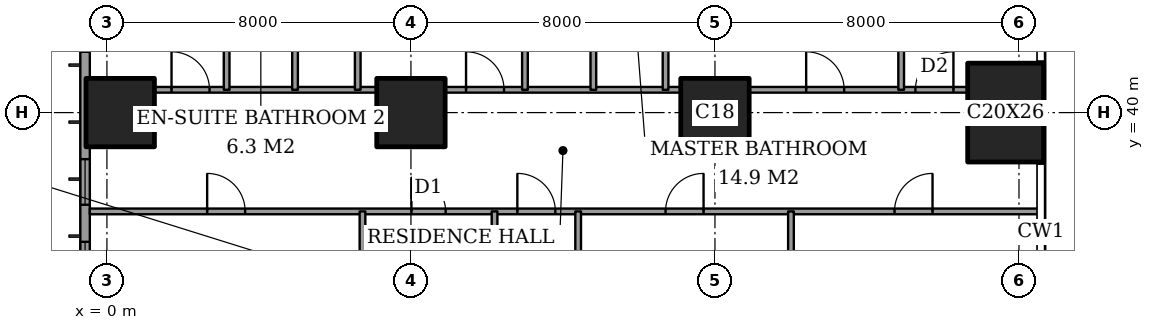
"""IFC4 building model, lengths in metres.
Left out: names, types, materials, properties, quantities, classifications, styles, units other than length and angle.
Written with IfcOpenShell. Run it as: python <this file> out.ifc"""

import sys

from ifc_helpers import new_model, si_unit, direction, frame, frame_2d, origin, origin_2d, place, context, subcontext, project, spatial, rectangle, extrude, element, fill, save


model = new_model("IFC4")
c1 = context("Model", 3, precision=1e-05, world=origin(), true_north=direction((0.0, 1.0)))
c2 = subcontext(c1, "Body", "Model", "MODEL_VIEW")
j1 = project(units=[si_unit("LENGTHUNIT", "METRE"), si_unit("PLANEANGLEUNIT", "RADIAN")], contexts=[c1])
p1 = place(None, origin())
s1 = spatial("IfcSite", under=j1, at=p1, CompositionType="ELEMENT")
p2 = place(p1, origin())
s2 = spatial("IfcBuilding", under=s1, at=p2, CompositionType="ELEMENT")
p3 = place(p2, frame((0.0, 0.0, 211.0)))
s3 = spatial("IfcBuildingStorey", under=s2, at=p3, CompositionType="ELEMENT", Elevation=211.0)
for number, where, z_axis, x_axis in (
    (1, (0.35, 40.0, 0.0), (0.0, 0.0, 1.0), (1.0, 0.0, 0.0)),
    (2, (8.0, 40.0, 0.0), (0.0, 0.0, 1.0), (1.0, 0.0, 0.0)),
    (3, (16.0, 40.0, 0.0), (0.0, 0.0, 1.0), (1.0, 0.0, 0.0)),
):
    element("IfcColumn", number, at=place(p3, frame(where, z_axis=z_axis, x_axis=x_axis)), inside=s3, PredefinedType="COLUMN", context=c2, shape_type="SweptSolid", body=[
        extrude(rectangle(XDim=1.8, YDim=1.8, at=origin_2d()), origin(), (0.0, 0.0, 1.0), 3.6),
    ])
p4 = place(p3, frame((23.65, 40.0, 0.0), z_axis=(0.0, 0.0, 1.0), x_axis=(1.0, 0.0, 0.0)))
e4 = element("IfcColumn", 4, at=p4, inside=s3, PredefinedType="COLUMN", context=c2, shape_type="SweptSolid", body=[
    extrude(rectangle(XDim=2.0, YDim=2.6, at=origin_2d()), origin(), (0.0, 0.0, 1.0), 3.6),
])
p5 = place(p3, frame((-0.575, 44.825, 0.0), z_axis=(0.0, 0.0, 1.0), x_axis=(0.0, -1.0, 0.0)))
e5 = element("IfcWall", 5, at=p5, inside=s3, PredefinedType="SOLIDWALL", context=c2, shape_type="SweptSolid", body=[
    extrude(rectangle(XDim=41.65, YDim=0.25, at=frame_2d((20.825, 0.0))), origin(), (0.0, 0.0, 1.0), 3.6),
])
p6 = place(p5, frame((0.825, 0.0, 0.2)))
e6 = element("IfcOpeningElement", 6, at=p6, cuts=e5, PredefinedType="OPENING", context=c2, shape_type="SweptSolid", body=[
    extrude(rectangle(XDim=2.4, YDim=2.4, at=frame_2d((1.2, 1.2))), frame((0.0, 0.135, 0.0), z_axis=(0.0, -1.0, 0.0), x_axis=(1.0, 0.0, 0.0)), (0.0, 0.0, 1.0), 0.27),
])
p7 = place(p5, frame((6.05, 0.0, 0.2)))
e7 = element("IfcOpeningElement", 7, at=p7, cuts=e5, PredefinedType="OPENING", context=c2, shape_type="SweptSolid", body=[
    extrude(rectangle(XDim=1.2, YDim=2.4, at=frame_2d((0.6, 1.2))), frame((0.0, 0.135, 0.0), z_axis=(0.0, -1.0, 0.0), x_axis=(1.0, 0.0, 0.0)), (0.0, 0.0, 1.0), 0.27),
])
p8 = place(p5, frame((8.225, 0.0, 0.2)))
e8 = element("IfcOpeningElement", 8, at=p8, cuts=e5, PredefinedType="OPENING", context=c2, shape_type="SweptSolid", body=[
    extrude(rectangle(XDim=2.4, YDim=2.4, at=frame_2d((1.2, 1.2))), frame((0.0, 0.135, 0.0), z_axis=(0.0, -1.0, 0.0), x_axis=(1.0, 0.0, 0.0)), (0.0, 0.0, 1.0), 0.27),
])
p9 = place(p5, frame((15.625, 0.0, 0.2)))
e9 = element("IfcOpeningElement", 9, at=p9, cuts=e5, PredefinedType="OPENING", context=c2, shape_type="SweptSolid", body=[
    extrude(rectangle(XDim=2.4, YDim=2.4, at=frame_2d((1.2, 1.2))), frame((0.0, 0.135, 0.0), z_axis=(0.0, -1.0, 0.0), x_axis=(1.0, 0.0, 0.0)), (0.0, 0.0, 1.0), 0.27),
])
p10 = place(p5, frame((23.625, 0.0, 0.2)))
e10 = element("IfcOpeningElement", 10, at=p10, cuts=e5, PredefinedType="OPENING", context=c2, shape_type="SweptSolid", body=[
    extrude(rectangle(XDim=2.4, YDim=2.4, at=frame_2d((1.2, 1.2))), frame((0.0, 0.135, 0.0), z_axis=(0.0, -1.0, 0.0), x_axis=(1.0, 0.0, 0.0)), (0.0, 0.0, 1.0), 0.27),
])
p11 = place(p5, frame((30.775, 0.0, 0.2)))
e11 = element("IfcOpeningElement", 11, at=p11, cuts=e5, PredefinedType="OPENING", context=c2, shape_type="SweptSolid", body=[
    extrude(rectangle(XDim=2.4, YDim=2.4, at=frame_2d((1.2, 1.2))), frame((0.0, 0.135, 0.0), z_axis=(0.0, -1.0, 0.0), x_axis=(1.0, 0.0, 0.0)), (0.0, 0.0, 1.0), 0.27),
])
p12 = place(p5, frame((34.55, 0.0, 0.2)))
e12 = element("IfcOpeningElement", 12, at=p12, cuts=e5, PredefinedType="OPENING", context=c2, shape_type="SweptSolid", body=[
    extrude(rectangle(XDim=1.2, YDim=2.4, at=frame_2d((0.6, 1.2))), frame((0.0, 0.135, 0.0), z_axis=(0.0, -1.0, 0.0), x_axis=(1.0, 0.0, 0.0)), (0.0, 0.0, 1.0), 0.27),
])
p13 = place(p5, frame((38.425, 0.0, 0.2)))
e13 = element("IfcOpeningElement", 13, at=p13, cuts=e5, PredefinedType="OPENING", context=c2, shape_type="SweptSolid", body=[
    extrude(rectangle(XDim=2.4, YDim=2.4, at=frame_2d((1.2, 1.2))), frame((0.0, 0.135, 0.0), z_axis=(0.0, -1.0, 0.0), x_axis=(1.0, 0.0, 0.0)), (0.0, 0.0, 1.0), 0.27),
])
p14 = place(p3, frame((-0.45, 37.4, 0.0), z_axis=(0.0, 0.0, 1.0), x_axis=(1.0, 0.0, 0.0)))
e14 = element("IfcWall", 14, at=p14, inside=s3, PredefinedType="PARTITIONING", context=c2, shape_type="SweptSolid", body=[
    extrude(rectangle(XDim=25.011, YDim=0.15, at=frame_2d((12.505, 0.0))), origin(), (0.0, 0.0, 1.0), 3.35),
])
p15 = place(p14, frame((11.25, 0.0, 0.0)))
e15 = element("IfcOpeningElement", 15, at=p15, cuts=e14, PredefinedType="OPENING", context=c2, shape_type="SweptSolid", body=[
    extrude(rectangle(XDim=1.0, YDim=2.1, at=frame_2d((0.5, 1.05))), frame((0.0, 0.085, 0.0), z_axis=(0.0, -1.0, 0.0), x_axis=(1.0, 0.0, 0.0)), (0.0, 0.0, 1.0), 0.17),
])
p16 = place(p14, frame((3.087, 0.0, 0.0)))
e16 = element("IfcOpeningElement", 16, at=p16, cuts=e14, PredefinedType="OPENING", context=c2, shape_type="SweptSolid", body=[
    extrude(rectangle(XDim=1.0, YDim=2.1, at=frame_2d((0.5, 1.05))), frame((0.0, 0.085, 0.0), z_axis=(0.0, -1.0, 0.0), x_axis=(1.0, 0.0, 0.0)), (0.0, 0.0, 1.0), 0.17),
])
p17 = place(p14, frame((8.462, 0.0, 0.0)))
e17 = element("IfcOpeningElement", 17, at=p17, cuts=e14, PredefinedType="OPENING", context=c2, shape_type="SweptSolid", body=[
    extrude(rectangle(XDim=0.9, YDim=2.1, at=frame_2d((0.45, 1.05))), frame((0.0, 0.085, 0.0), z_axis=(0.0, -1.0, 0.0), x_axis=(1.0, 0.0, 0.0)), (0.0, 0.0, 1.0), 0.17),
])
p18 = place(p14, frame((15.15, 0.0, 0.0)))
e18 = element("IfcOpeningElement", 18, at=p18, cuts=e14, PredefinedType="OPENING", context=c2, shape_type="SweptSolid", body=[
    extrude(rectangle(XDim=1.0, YDim=2.1, at=frame_2d((0.5, 1.05))), frame((0.0, 0.085, 0.0), z_axis=(0.0, -1.0, 0.0), x_axis=(1.0, 0.0, 0.0)), (0.0, 0.0, 1.0), 0.17),
])
p19 = place(p14, frame((21.175, 0.0, 0.0)))
e19 = element("IfcOpeningElement", 19, at=p19, cuts=e14, PredefinedType="OPENING", context=c2, shape_type="SweptSolid", body=[
    extrude(rectangle(XDim=1.0, YDim=2.1, at=frame_2d((0.5, 1.05))), frame((0.0, 0.085, 0.0), z_axis=(0.0, -1.0, 0.0), x_axis=(1.0, 0.0, 0.0)), (0.0, 0.0, 1.0), 0.17),
])
p20 = place(p3, frame((1.25, 40.6, 0.0), z_axis=(0.0, 0.0, 1.0), x_axis=(1.0, 0.0, 0.0)))
e20 = element("IfcWall", 20, at=p20, inside=s3, PredefinedType="PARTITIONING", context=c2, shape_type="SweptSolid", body=[
    extrude(rectangle(XDim=5.85, YDim=0.15, at=frame_2d((2.925, 0.0))), origin(), (0.0, 0.0, 1.0), 3.35),
])
p21 = place(p20, frame((0.45, 0.0, 0.0)))
e21 = element("IfcOpeningElement", 21, at=p21, cuts=e20, PredefinedType="OPENING", context=c2, shape_type="SweptSolid", body=[
    extrude(rectangle(XDim=1.0, YDim=2.1, at=frame_2d((0.5, 1.05))), frame((0.0, 0.085, 0.0), z_axis=(0.0, -1.0, 0.0), x_axis=(1.0, 0.0, 0.0)), (0.0, 0.0, 1.0), 0.17),
])
p22 = place(p3, frame((8.9, 40.6, 0.0), z_axis=(0.0, 0.0, 1.0), x_axis=(1.0, 0.0, 0.0)))
e22 = element("IfcWall", 22, at=p22, inside=s3, PredefinedType="PARTITIONING", context=c2, shape_type="SweptSolid", body=[
    extrude(rectangle(XDim=6.2, YDim=0.15, at=frame_2d((3.1, 0.0))), origin(), (0.0, 0.0, 1.0), 3.35),
])
p23 = place(p22, frame((0.55, 0.0, 0.0)))
e23 = element("IfcOpeningElement", 23, at=p23, cuts=e22, PredefinedType="OPENING", context=c2, shape_type="SweptSolid", body=[
    extrude(rectangle(XDim=1.0, YDim=2.1, at=frame_2d((0.5, 1.05))), frame((0.0, 0.085, 0.0), z_axis=(0.0, -1.0, 0.0), x_axis=(1.0, 0.0, 0.0)), (0.0, 0.0, 1.0), 0.17),
])
p24 = place(p3, frame((16.9, 40.6, 0.0), z_axis=(0.0, 0.0, 1.0), x_axis=(1.0, 0.0, 0.0)))
e24 = element("IfcWall", 24, at=p24, inside=s3, PredefinedType="PARTITIONING", context=c2, shape_type="SweptSolid", body=[
    extrude(rectangle(XDim=5.75, YDim=0.15, at=frame_2d((2.875, 0.0))), origin(), (0.0, 0.0, 1.0), 3.35),
])
p25 = place(p24, frame((1.5, 0.0, 0.0)))
e25 = element("IfcOpeningElement", 25, at=p25, cuts=e24, PredefinedType="OPENING", context=c2, shape_type="SweptSolid", body=[
    extrude(rectangle(XDim=1.0, YDim=2.1, at=frame_2d((0.5, 1.05))), frame((0.0, 0.085, 0.0), z_axis=(0.0, -1.0, 0.0), x_axis=(1.0, 0.0, 0.0)), (0.0, 0.0, 1.0), 0.17),
])
p26 = place(p24, frame((4.375, 0.0, 0.0)))
e26 = element("IfcOpeningElement", 26, at=p26, cuts=e24, PredefinedType="OPENING", context=c2, shape_type="SweptSolid", body=[
    extrude(rectangle(XDim=1.0, YDim=2.1, at=frame_2d((0.5, 1.05))), frame((0.0, 0.085, 0.0), z_axis=(0.0, -1.0, 0.0), x_axis=(1.0, 0.0, 0.0)), (0.0, 0.0, 1.0), 0.17),
])
p27 = place(p3, frame((3.15, 40.6, 0.0), z_axis=(0.0, 0.0, 1.0), x_axis=(0.0, 1.0, 0.0)))
e27 = element("IfcWall", 27, at=p27, inside=s3, PredefinedType="PARTITIONING", context=c2, shape_type="SweptSolid", body=[
    extrude(rectangle(XDim=3.5, YDim=0.15, at=frame_2d((1.75, 0.0))), origin(), (0.0, 0.0, 1.0), 3.35),
])
p28 = place(p27, frame((1.3, 0.0, 0.0)))
e28 = element("IfcOpeningElement", 28, at=p28, cuts=e27, PredefinedType="OPENING", context=c2, shape_type="SweptSolid", body=[
    extrude(rectangle(XDim=0.9, YDim=2.1, at=frame_2d((0.45, 1.05))), frame((0.0, 0.085, 0.0), z_axis=(0.0, -1.0, 0.0), x_axis=(1.0, 0.0, 0.0)), (0.0, 0.0, 1.0), 0.17),
])
p29 = place(p3, frame((4.95, 40.6, 0.0), z_axis=(0.0, 0.0, 1.0), x_axis=(0.0, 1.0, 0.0)))
e29 = element("IfcWall", 29, at=p29, inside=s3, PredefinedType="PARTITIONING", context=c2, shape_type="SweptSolid", body=[
    extrude(rectangle(XDim=7.85, YDim=0.15, at=frame_2d((3.925, 0.0))), origin(), (0.0, 0.0, 1.0), 3.35),
])
p30 = place(p29, frame((5.225, 0.0, 0.0)))
e30 = element("IfcOpeningElement", 30, at=p30, cuts=e29, PredefinedType="OPENING", context=c2, shape_type="SweptSolid", body=[
    extrude(rectangle(XDim=0.9, YDim=2.1, at=frame_2d((0.45, 1.05))), frame((0.0, 0.085, 0.0), z_axis=(0.0, -1.0, 0.0), x_axis=(1.0, 0.0, 0.0)), (0.0, 0.0, 1.0), 0.17),
])
p31 = place(p3, frame((6.6, 40.6, 0.0), z_axis=(0.0, 0.0, 1.0), x_axis=(0.0, 1.0, 0.0)))
e31 = element("IfcWall", 31, at=p31, inside=s3, PredefinedType="PARTITIONING", context=c2, shape_type="SweptSolid", body=[
    extrude(rectangle(XDim=7.85, YDim=0.15, at=frame_2d((3.925, 0.0))), origin(), (0.0, 0.0, 1.0), 3.35),
])
p32 = place(p3, frame((6.725, 33.2, 0.0), z_axis=(0.0, 0.0, 1.0), x_axis=(0.0, 1.0, 0.0)))
e32 = element("IfcWall", 32, at=p32, inside=s3, PredefinedType="PARTITIONING", context=c2, shape_type="SweptSolid", body=[
    extrude(rectangle(XDim=4.2, YDim=0.15, at=frame_2d((2.1, 0.0))), origin(), (0.0, 0.0, 1.0), 3.35),
])
p33 = place(p3, frame((10.2, 28.0, 0.0), z_axis=(0.0, 0.0, 1.0), x_axis=(0.0, 1.0, 0.0)))
e33 = element("IfcWall", 33, at=p33, inside=s3, PredefinedType="PARTITIONING", context=c2, shape_type="SweptSolid", body=[
    extrude(rectangle(XDim=9.4, YDim=0.15, at=frame_2d((4.7, 0.0))), origin(), (0.0, 0.0, 1.0), 3.35),
])
p34 = place(p33, frame((0.837, 0.0, 0.0)))
e34 = element("IfcOpeningElement", 34, at=p34, cuts=e33, PredefinedType="OPENING", context=c2, shape_type="SweptSolid", body=[
    extrude(rectangle(XDim=1.0, YDim=2.1, at=frame_2d((0.5, 1.05))), frame((0.0, 0.085, 0.0), z_axis=(0.0, -1.0, 0.0), x_axis=(1.0, 0.0, 0.0)), (0.0, 0.0, 1.0), 0.17),
])
p35 = place(p3, frame((11.0, 40.6, 0.0), z_axis=(0.0, 0.0, 1.0), x_axis=(0.0, 1.0, 0.0)))
e35 = element("IfcWall", 35, at=p35, inside=s3, PredefinedType="PARTITIONING", context=c2, shape_type="SweptSolid", body=[
    extrude(rectangle(XDim=7.85, YDim=0.15, at=frame_2d((3.925, 0.0))), origin(), (0.0, 0.0, 1.0), 3.35),
])
p36 = place(p35, frame((3.475, 0.0, 0.0)))
e36 = element("IfcOpeningElement", 36, at=p36, cuts=e35, PredefinedType="OPENING", context=c2, shape_type="SweptSolid", body=[
    extrude(rectangle(XDim=0.9, YDim=2.1, at=frame_2d((0.45, 1.05))), frame((0.0, 0.085, 0.0), z_axis=(0.0, -1.0, 0.0), x_axis=(1.0, 0.0, 0.0)), (0.0, 0.0, 1.0), 0.17),
])
p37 = place(p3, frame((12.4, 30.675, 0.0), z_axis=(0.0, 0.0, 1.0), x_axis=(0.0, 1.0, 0.0)))
e37 = element("IfcWall", 37, at=p37, inside=s3, PredefinedType="PARTITIONING", context=c2, shape_type="SweptSolid", body=[
    extrude(rectangle(XDim=6.725, YDim=0.15, at=frame_2d((3.362, 0.0))), origin(), (0.0, 0.0, 1.0), 3.35),
])
p38 = place(p3, frame((12.8, 40.6, 0.0), z_axis=(0.0, 0.0, 1.0), x_axis=(0.0, 1.0, 0.0)))
e38 = element("IfcWall", 38, at=p38, inside=s3, PredefinedType="PARTITIONING", context=c2, shape_type="SweptSolid", body=[
    extrude(rectangle(XDim=7.85, YDim=0.15, at=frame_2d((3.925, 0.0))), origin(), (0.0, 0.0, 1.0), 3.35),
])
p39 = place(p3, frame((14.7, 40.6, 0.0), z_axis=(0.0, 0.0, 1.0), x_axis=(0.0, 1.0, 0.0)))
e39 = element("IfcWall", 39, at=p39, inside=s3, PredefinedType="PARTITIONING", context=c2, shape_type="SweptSolid", body=[
    extrude(rectangle(XDim=7.85, YDim=0.15, at=frame_2d((3.925, 0.0))), origin(), (0.0, 0.0, 1.0), 3.35),
])
p40 = place(p39, frame((3.475, 0.0, 0.0)))
e40 = element("IfcOpeningElement", 40, at=p40, cuts=e39, PredefinedType="OPENING", context=c2, shape_type="SweptSolid", body=[
    extrude(rectangle(XDim=0.9, YDim=2.1, at=frame_2d((0.45, 1.05))), frame((0.0, 0.085, 0.0), z_axis=(0.0, -1.0, 0.0), x_axis=(1.0, 0.0, 0.0)), (0.0, 0.0, 1.0), 0.17),
])
p41 = place(p3, frame((18.0, 28.0, 0.0), z_axis=(0.0, 0.0, 1.0), x_axis=(0.0, 1.0, 0.0)))
e41 = element("IfcWall", 41, at=p41, inside=s3, PredefinedType="PARTITIONING", context=c2, shape_type="SweptSolid", body=[
    extrude(rectangle(XDim=9.4, YDim=0.15, at=frame_2d((4.7, 0.0))), origin(), (0.0, 0.0, 1.0), 3.35),
])
p42 = place(p41, frame((0.837, 0.0, 0.0)))
e42 = element("IfcOpeningElement", 42, at=p42, cuts=e41, PredefinedType="OPENING", context=c2, shape_type="SweptSolid", body=[
    extrude(rectangle(XDim=1.0, YDim=2.1, at=frame_2d((0.5, 1.05))), frame((0.0, 0.085, 0.0), z_axis=(0.0, -1.0, 0.0), x_axis=(1.0, 0.0, 0.0)), (0.0, 0.0, 1.0), 0.17),
])
p43 = place(p3, frame((20.9, 40.6, 0.0), z_axis=(0.0, 0.0, 1.0), x_axis=(0.0, 1.0, 0.0)))
e43 = element("IfcWall", 43, at=p43, inside=s3, PredefinedType="PARTITIONING", context=c2, shape_type="SweptSolid", body=[
    extrude(rectangle(XDim=7.85, YDim=0.15, at=frame_2d((3.925, 0.0))), origin(), (0.0, 0.0, 1.0), 3.35),
])
p44 = place(p7, origin())
e44 = element("IfcWindow", 44, at=p44, inside=s3, PartitioningType="SINGLE_PANEL", PredefinedType="WINDOW", context=c2, shape_type="SweptSolid", body=[
    extrude(rectangle(XDim=1.2, YDim=2.4, at=frame_2d((0.6, 1.2))), frame((0.0, 0.03, 0.0), z_axis=(0.0, -1.0, 0.0), x_axis=(1.0, 0.0, 0.0)), (0.0, 0.0, 1.0), 0.06),
])
fill(e7, e44)
p45 = place(p8, origin())
e45 = element("IfcWindow", 45, at=p45, inside=s3, PartitioningType="SINGLE_PANEL", PredefinedType="WINDOW", context=c2, shape_type="SweptSolid", body=[
    extrude(rectangle(XDim=2.4, YDim=2.4, at=frame_2d((1.2, 1.2))), frame((0.0, 0.03, 0.0), z_axis=(0.0, -1.0, 0.0), x_axis=(1.0, 0.0, 0.0)), (0.0, 0.0, 1.0), 0.06),
])
fill(e8, e45)
p46 = place(p21, origin())
e46 = element("IfcDoor", 46, at=p46, inside=s3, OperationType="SINGLE_SWING_RIGHT", PredefinedType="DOOR", context=c2, shape_type="SweptSolid", body=[
    extrude(rectangle(XDim=1.0, YDim=2.1, at=frame_2d((0.5, 1.05))), frame((0.0, 0.025, 0.0), z_axis=(0.0, -1.0, 0.0), x_axis=(1.0, 0.0, 0.0)), (0.0, 0.0, 1.0), 0.05),
])
fill(e21, e46)
p47 = place(p23, origin())
e47 = element("IfcDoor", 47, at=p47, inside=s3, OperationType="SINGLE_SWING_RIGHT", PredefinedType="DOOR", context=c2, shape_type="SweptSolid", body=[
    extrude(rectangle(XDim=1.0, YDim=2.1, at=frame_2d((0.5, 1.05))), frame((0.0, 0.025, 0.0), z_axis=(0.0, -1.0, 0.0), x_axis=(1.0, 0.0, 0.0)), (0.0, 0.0, 1.0), 0.05),
])
fill(e23, e47)
p48 = place(p25, origin())
e48 = element("IfcDoor", 48, at=p48, inside=s3, OperationType="SINGLE_SWING_RIGHT", PredefinedType="DOOR", context=c2, shape_type="SweptSolid", body=[
    extrude(rectangle(XDim=1.0, YDim=2.1, at=frame_2d((0.5, 1.05))), frame((0.0, 0.025, 0.0), z_axis=(0.0, -1.0, 0.0), x_axis=(1.0, 0.0, 0.0)), (0.0, 0.0, 1.0), 0.05),
])
fill(e25, e48)
p49 = place(p26, origin())
e49 = element("IfcDoor", 49, at=p49, inside=s3, OperationType="SINGLE_SWING_LEFT", PredefinedType="DOOR", context=c2, shape_type="SweptSolid", body=[
    extrude(rectangle(XDim=1.0, YDim=2.1, at=frame_2d((0.5, 1.05))), frame((0.0, 0.025, 0.0), z_axis=(0.0, -1.0, 0.0), x_axis=(1.0, 0.0, 0.0)), (0.0, 0.0, 1.0), 0.05),
])
fill(e26, e49)
p50 = place(p15, origin())
e50 = element("IfcDoor", 50, at=p50, inside=s3, OperationType="SINGLE_SWING_RIGHT", PredefinedType="DOOR", context=c2, shape_type="SweptSolid", body=[
    extrude(rectangle(XDim=1.0, YDim=2.1, at=frame_2d((0.5, 1.05))), frame((0.0, 0.025, 0.0), z_axis=(0.0, -1.0, 0.0), x_axis=(1.0, 0.0, 0.0)), (0.0, 0.0, 1.0), 0.05),
])
fill(e15, e50)
p51 = place(p16, origin())
e51 = element("IfcDoor", 51, at=p51, inside=s3, OperationType="SINGLE_SWING_RIGHT", PredefinedType="DOOR", context=c2, shape_type="SweptSolid", body=[
    extrude(rectangle(XDim=1.0, YDim=2.1, at=frame_2d((0.5, 1.05))), frame((0.0, 0.025, 0.0), z_axis=(0.0, -1.0, 0.0), x_axis=(1.0, 0.0, 0.0)), (0.0, 0.0, 1.0), 0.05),
])
fill(e16, e51)
p52 = place(p17, origin())
e52 = element("IfcDoor", 52, at=p52, inside=s3, OperationType="SINGLE_SWING_RIGHT", PredefinedType="DOOR", context=c2, shape_type="SweptSolid", body=[
    extrude(rectangle(XDim=0.9, YDim=2.1, at=frame_2d((0.45, 1.05))), frame((0.0, 0.025, 0.0), z_axis=(0.0, -1.0, 0.0), x_axis=(1.0, 0.0, 0.0)), (0.0, 0.0, 1.0), 0.05),
])
fill(e17, e52)
p53 = place(p18, origin())
e53 = element("IfcDoor", 53, at=p53, inside=s3, OperationType="SINGLE_SWING_LEFT", PredefinedType="DOOR", context=c2, shape_type="SweptSolid", body=[
    extrude(rectangle(XDim=1.0, YDim=2.1, at=frame_2d((0.5, 1.05))), frame((0.0, 0.025, 0.0), z_axis=(0.0, -1.0, 0.0), x_axis=(1.0, 0.0, 0.0)), (0.0, 0.0, 1.0), 0.05),
])
fill(e18, e53)
p54 = place(p19, origin())
e54 = element("IfcDoor", 54, at=p54, inside=s3, OperationType="SINGLE_SWING_LEFT", PredefinedType="DOOR", context=c2, shape_type="SweptSolid", body=[
    extrude(rectangle(XDim=1.0, YDim=2.1, at=frame_2d((0.5, 1.05))), frame((0.0, 0.025, 0.0), z_axis=(0.0, -1.0, 0.0), x_axis=(1.0, 0.0, 0.0)), (0.0, 0.0, 1.0), 0.05),
])
fill(e19, e54)
save(model, sys.argv[1])
